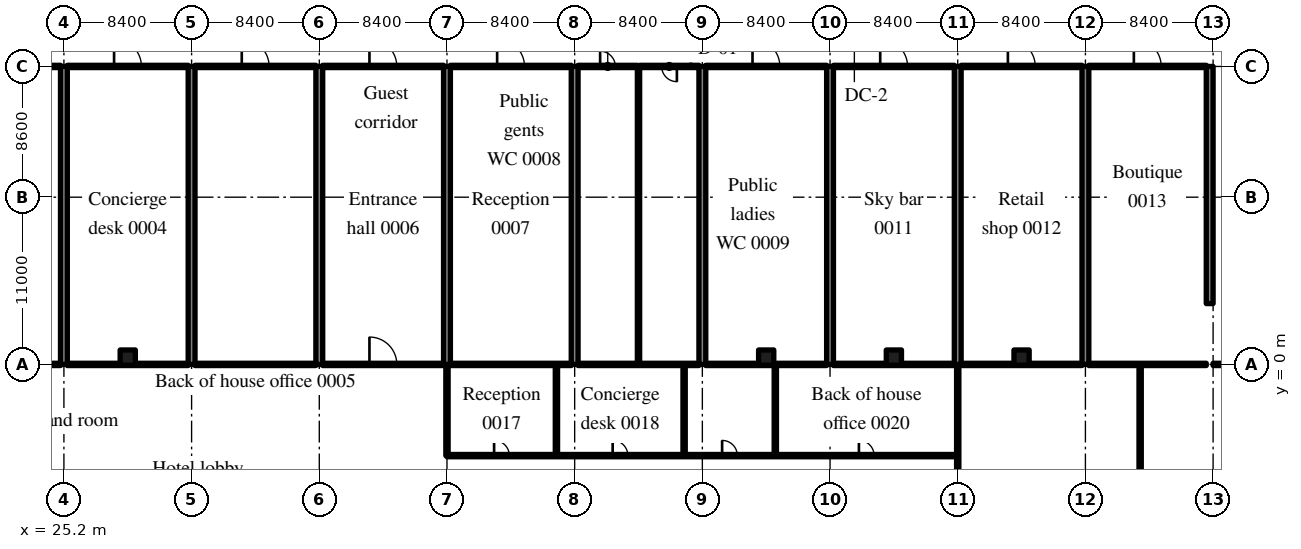
"""IFC4 building model, lengths in metres.
Left out: names, types, materials, properties, quantities, classifications, styles, units other than length and angle.
Written with IfcOpenShell. Run it as: python <this file> out.ifc"""

import sys

from ifc_helpers import new_model, si_unit, direction, frame, frame_2d, origin, origin_2d, place, context, subcontext, project, spatial, rectangle, extrude, source, transform, mapped, element, fill, save


model = new_model("IFC4")
c1 = context("Model", 3, precision=1e-05, world=origin(), true_north=direction((0.0, 1.0)))
c2 = subcontext(c1, "Body", "Model", "MODEL_VIEW")
j1 = project(units=[si_unit("LENGTHUNIT", "METRE"), si_unit("PLANEANGLEUNIT", "RADIAN")], contexts=[c1])
p1 = place(None, origin())
s1 = spatial("IfcSite", under=j1, at=p1, CompositionType="ELEMENT")
p2 = place(p1, origin())
s2 = spatial("IfcBuilding", under=s1, at=p2, CompositionType="ELEMENT")
p3 = place(p2, origin())
s3 = spatial("IfcBuildingStorey", under=s2, at=p3, CompositionType="ELEMENT", Elevation=0.0)
m1 = source(origin(), c2, "Body", "SweptSolid", [
    extrude(rectangle(XDim=19.6, YDim=0.45, at=frame_2d((9.8, 0.0))), origin(), (0.0, 0.0, 1.0), 5.72),
])
for number, where, z_axis, x_axis in (
    (1, (25.2, 0.0, 0.0), (0.0, 0.0, 1.0), (0.0, 1.0, 0.0)),
    (2, (33.6, 0.0, 0.0), (0.0, 0.0, 1.0), (0.0, 1.0, 0.0)),
    (3, (42.0, 0.0, 0.0), (0.0, 0.0, 1.0), (0.0, 1.0, 0.0)),
    (4, (50.4, 0.0, 0.0), (0.0, 0.0, 1.0), (0.0, 1.0, 0.0)),
    (5, (58.8, 0.0, 0.0), (0.0, 0.0, 1.0), (0.0, 1.0, 0.0)),
    (6, (67.2, 0.0, 0.0), (0.0, 0.0, 1.0), (0.0, 1.0, 0.0)),
    (7, (75.6, 0.0, 0.0), (0.0, 0.0, 1.0), (0.0, 1.0, 0.0)),
    (8, (84.0, 0.0, 0.0), (0.0, 0.0, 1.0), (0.0, 1.0, 0.0)),
    (9, (92.4, 0.0, 0.0), (0.0, 0.0, 1.0), (0.0, 1.0, 0.0)),
):
    element("IfcWall", number, at=place(p3, frame(where, z_axis=z_axis, x_axis=x_axis)), inside=s3, PredefinedType="SHEAR", context=c2, shape_type="MappedRepresentation", body=[
        mapped(m1, transform((0.0, 0.0, 0.0), scale=1.0)),
    ])
m2 = source(origin(), c2, "Body", "SweptSolid", [
    extrude(rectangle(XDim=15.6, YDim=0.45, at=frame_2d((7.8, 0.0))), origin(), (0.0, 0.0, 1.0), 5.72),
])
p4 = place(p3, frame((100.575, 4.0, 0.0), z_axis=(0.0, 0.0, 1.0), x_axis=(0.0, 1.0, 0.0)))
e10 = element("IfcWall", 10, at=p4, inside=s3, PredefinedType="SHEAR", context=c2, shape_type="MappedRepresentation", body=[
    mapped(m2, transform((0.0, 0.0, 0.0), scale=1.0)),
])
m3 = source(origin(), c2, "Body", "SweptSolid", [
    extrude(rectangle(XDim=1.0, YDim=1.0, at=origin_2d()), origin(), (0.0, 0.0, 1.0), 5.72),
])
for number, where, z_axis, x_axis in (
    (11, (29.4, 0.45, 0.0), (0.0, 0.0, 1.0), (1.0, 0.0, 0.0)),
    (12, (71.4, 0.45, 0.0), (0.0, 0.0, 1.0), (1.0, 0.0, 0.0)),
    (13, (79.8, 0.45, 0.0), (0.0, 0.0, 1.0), (1.0, 0.0, 0.0)),
    (14, (88.2, 0.45, 0.0), (0.0, 0.0, 1.0), (1.0, 0.0, 0.0)),
):
    element("IfcColumn", number, at=place(p3, frame(where, z_axis=z_axis, x_axis=x_axis)), inside=s3, PredefinedType="COLUMN", context=c2, shape_type="MappedRepresentation", body=[
        mapped(m3, transform((0.0, 0.0, 0.0), scale=1.0)),
    ])
m4 = source(origin(), c2, "Body", "SweptSolid", [
    extrude(rectangle(XDim=7.95, YDim=0.15, at=frame_2d((3.975, 0.0))), origin(), (0.0, 0.0, 1.0), 5.02),
])
p5 = place(p3, frame((17.025, 19.6, 0.0), z_axis=(0.0, 0.0, 1.0), x_axis=(1.0, 0.0, 0.0)))
e15 = element("IfcWall", 15, at=p5, inside=s3, PredefinedType="PARTITIONING", context=c2, shape_type="MappedRepresentation", body=[
    mapped(m4, transform((0.0, 0.0, 0.0), scale=1.0)),
])
m5 = source(origin(), c2, "Body", "SweptSolid", [
    extrude(rectangle(XDim=1.8, YDim=2.1, at=frame_2d((0.9, 1.05))), frame((0.0, 0.085, 0.0), z_axis=(0.0, -1.0, 0.0), x_axis=(1.0, 0.0, 0.0)), (0.0, 0.0, 1.0), 0.17),
])
p6 = place(p5, frame((3.075, 0.0, 0.0)))
e16 = element("IfcOpeningElement", 16, at=p6, cuts=e15, PredefinedType="OPENING", context=c2, shape_type="MappedRepresentation", body=[
    mapped(m5, transform((0.0, 0.0, 0.0), scale=1.0)),
])
m6 = source(origin(), c2, "Body", "SweptSolid", [
    extrude(rectangle(XDim=7.95, YDim=0.15, at=frame_2d((3.975, 0.0))), origin(), (0.0, 0.0, 1.0), 5.72),
])
p7 = place(p3, frame((17.025, 0.0, 0.0), z_axis=(0.0, 0.0, 1.0), x_axis=(1.0, 0.0, 0.0)))
e17 = element("IfcWall", 17, at=p7, inside=s3, PredefinedType="PARTITIONING", context=c2, shape_type="MappedRepresentation", body=[
    mapped(m6, transform((0.0, 0.0, 0.0), scale=1.0)),
])
m7 = source(origin(), c2, "Body", "SweptSolid", [
    extrude(rectangle(XDim=7.95, YDim=0.15, at=frame_2d((3.975, 0.0))), origin(), (0.0, 0.0, 1.0), 5.02),
])
p8 = place(p3, frame((25.425, 19.6, 0.0), z_axis=(0.0, 0.0, 1.0), x_axis=(1.0, 0.0, 0.0)))
e18 = element("IfcWall", 18, at=p8, inside=s3, PredefinedType="PARTITIONING", context=c2, shape_type="MappedRepresentation", body=[
    mapped(m7, transform((0.0, 0.0, 0.0), scale=1.0)),
])
p9 = place(p8, frame((3.075, 0.0, 0.0)))
e19 = element("IfcOpeningElement", 19, at=p9, cuts=e18, PredefinedType="OPENING", context=c2, shape_type="MappedRepresentation", body=[
    mapped(m5, transform((0.0, 0.0, 0.0), scale=1.0)),
])
m8 = source(origin(), c2, "Body", "SweptSolid", [
    extrude(rectangle(XDim=7.95, YDim=0.15, at=frame_2d((3.975, 0.0))), origin(), (0.0, 0.0, 1.0), 5.72),
])
p10 = place(p3, frame((25.425, 0.0, 0.0), z_axis=(0.0, 0.0, 1.0), x_axis=(1.0, 0.0, 0.0)))
e20 = element("IfcWall", 20, at=p10, inside=s3, PredefinedType="PARTITIONING", context=c2, shape_type="MappedRepresentation", body=[
    mapped(m8, transform((0.0, 0.0, 0.0), scale=1.0)),
])
p11 = place(p3, frame((33.825, 19.6, 0.0), z_axis=(0.0, 0.0, 1.0), x_axis=(1.0, 0.0, 0.0)))
e21 = element("IfcWall", 21, at=p11, inside=s3, PredefinedType="PARTITIONING", context=c2, shape_type="MappedRepresentation", body=[
    mapped(m7, transform((0.0, 0.0, 0.0), scale=1.0)),
])
p12 = place(p11, frame((3.075, 0.0, 0.0)))
e22 = element("IfcOpeningElement", 22, at=p12, cuts=e21, PredefinedType="OPENING", context=c2, shape_type="MappedRepresentation", body=[
    mapped(m5, transform((0.0, 0.0, 0.0), scale=1.0)),
])
p13 = place(p3, frame((33.825, 0.0, 0.0), z_axis=(0.0, 0.0, 1.0), x_axis=(1.0, 0.0, 0.0)))
e23 = element("IfcWall", 23, at=p13, inside=s3, PredefinedType="PARTITIONING", context=c2, shape_type="MappedRepresentation", body=[
    mapped(m8, transform((0.0, 0.0, 0.0), scale=1.0)),
])
p14 = place(p3, frame((42.225, 19.6, 0.0), z_axis=(0.0, 0.0, 1.0), x_axis=(1.0, 0.0, 0.0)))
e24 = element("IfcWall", 24, at=p14, inside=s3, PredefinedType="PARTITIONING", context=c2, shape_type="MappedRepresentation", body=[
    mapped(m7, transform((0.0, 0.0, 0.0), scale=1.0)),
])
p15 = place(p14, frame((3.075, 0.0, 0.0)))
e25 = element("IfcOpeningElement", 25, at=p15, cuts=e24, PredefinedType="OPENING", context=c2, shape_type="MappedRepresentation", body=[
    mapped(m5, transform((0.0, 0.0, 0.0), scale=1.0)),
])
p16 = place(p3, frame((42.225, 0.0, 0.0), z_axis=(0.0, 0.0, 1.0), x_axis=(1.0, 0.0, 0.0)))
e26 = element("IfcWall", 26, at=p16, inside=s3, PredefinedType="PARTITIONING", context=c2, shape_type="MappedRepresentation", body=[
    mapped(m8, transform((0.0, 0.0, 0.0), scale=1.0)),
])
p17 = place(p16, frame((3.075, 0.0, 0.0)))
e27 = element("IfcOpeningElement", 27, at=p17, cuts=e26, PredefinedType="OPENING", context=c2, shape_type="MappedRepresentation", body=[
    mapped(m5, transform((0.0, 0.0, 0.0), scale=1.0)),
])
p18 = place(p3, frame((50.625, 19.6, 0.0), z_axis=(0.0, 0.0, 1.0), x_axis=(1.0, 0.0, 0.0)))
e28 = element("IfcWall", 28, at=p18, inside=s3, PredefinedType="PARTITIONING", context=c2, shape_type="MappedRepresentation", body=[
    mapped(m7, transform((0.0, 0.0, 0.0), scale=1.0)),
])
p19 = place(p18, frame((3.075, 0.0, 0.0)))
e29 = element("IfcOpeningElement", 29, at=p19, cuts=e28, PredefinedType="OPENING", context=c2, shape_type="MappedRepresentation", body=[
    mapped(m5, transform((0.0, 0.0, 0.0), scale=1.0)),
])
p20 = place(p3, frame((50.625, 0.0, 0.0), z_axis=(0.0, 0.0, 1.0), x_axis=(1.0, 0.0, 0.0)))
e30 = element("IfcWall", 30, at=p20, inside=s3, PredefinedType="PARTITIONING", context=c2, shape_type="MappedRepresentation", body=[
    mapped(m8, transform((0.0, 0.0, 0.0), scale=1.0)),
])
m9 = source(origin(), c2, "Body", "SweptSolid", [
    extrude(rectangle(XDim=3.9, YDim=0.15, at=frame_2d((1.95, 0.0))), origin(), (0.0, 0.0, 1.0), 5.02),
])
p21 = place(p3, frame((59.025, 19.6, 0.0), z_axis=(0.0, 0.0, 1.0), x_axis=(1.0, 0.0, 0.0)))
e31 = element("IfcWall", 31, at=p21, inside=s3, PredefinedType="PARTITIONING", context=c2, shape_type="MappedRepresentation", body=[
    mapped(m9, transform((0.0, 0.0, 0.0), scale=1.0)),
])
m10 = source(origin(), c2, "Body", "SweptSolid", [
    extrude(rectangle(XDim=1.0, YDim=2.1, at=frame_2d((0.5, 1.05))), frame((0.0, 0.085, 0.0), z_axis=(0.0, -1.0, 0.0), x_axis=(1.0, 0.0, 0.0)), (0.0, 0.0, 1.0), 0.17),
])
p22 = place(p21, frame((1.45, 0.0, 0.0)))
e32 = element("IfcOpeningElement", 32, at=p22, cuts=e31, PredefinedType="OPENING", context=c2, shape_type="MappedRepresentation", body=[
    mapped(m10, transform((0.0, 0.0, 0.0), scale=1.0)),
])
p23 = place(p3, frame((63.075, 19.6, 0.0), z_axis=(0.0, 0.0, 1.0), x_axis=(1.0, 0.0, 0.0)))
e33 = element("IfcWall", 33, at=p23, inside=s3, PredefinedType="PARTITIONING", context=c2, shape_type="MappedRepresentation", body=[
    mapped(m9, transform((0.0, 0.0, 0.0), scale=1.0)),
])
p24 = place(p23, frame((1.45, 0.0, 0.0)))
e34 = element("IfcOpeningElement", 34, at=p24, cuts=e33, PredefinedType="OPENING", context=c2, shape_type="MappedRepresentation", body=[
    mapped(m10, transform((0.0, 0.0, 0.0), scale=1.0)),
])
m11 = source(origin(), c2, "Body", "SweptSolid", [
    extrude(rectangle(XDim=19.375, YDim=0.15, at=frame_2d((9.688, 0.0))), origin(), (0.0, 0.0, 1.0), 5.72),
])
p25 = place(p3, frame((63.0, 0.15, 0.0), z_axis=(0.0, 0.0, 1.0), x_axis=(0.0, 1.0, 0.0)))
e35 = element("IfcWall", 35, at=p25, inside=s3, PredefinedType="PARTITIONING", context=c2, shape_type="MappedRepresentation", body=[
    mapped(m11, transform((0.0, 0.0, 0.0), scale=1.0)),
])
p26 = place(p3, frame((59.025, 0.0, 0.0), z_axis=(0.0, 0.0, 1.0), x_axis=(1.0, 0.0, 0.0)))
e36 = element("IfcWall", 36, at=p26, inside=s3, PredefinedType="PARTITIONING", context=c2, shape_type="MappedRepresentation", body=[
    mapped(m6, transform((0.0, 0.0, 0.0), scale=1.0)),
])
p27 = place(p3, frame((67.425, 19.6, 0.0), z_axis=(0.0, 0.0, 1.0), x_axis=(1.0, 0.0, 0.0)))
e37 = element("IfcWall", 37, at=p27, inside=s3, PredefinedType="PARTITIONING", context=c2, shape_type="MappedRepresentation", body=[
    mapped(m7, transform((0.0, 0.0, 0.0), scale=1.0)),
])
p28 = place(p27, frame((3.075, 0.0, 0.0)))
e38 = element("IfcOpeningElement", 38, at=p28, cuts=e37, PredefinedType="OPENING", context=c2, shape_type="MappedRepresentation", body=[
    mapped(m5, transform((0.0, 0.0, 0.0), scale=1.0)),
])
p29 = place(p3, frame((67.425, 0.0, 0.0), z_axis=(0.0, 0.0, 1.0), x_axis=(1.0, 0.0, 0.0)))
e39 = element("IfcWall", 39, at=p29, inside=s3, PredefinedType="PARTITIONING", context=c2, shape_type="MappedRepresentation", body=[
    mapped(m8, transform((0.0, 0.0, 0.0), scale=1.0)),
])
p30 = place(p3, frame((75.825, 19.6, 0.0), z_axis=(0.0, 0.0, 1.0), x_axis=(1.0, 0.0, 0.0)))
e40 = element("IfcWall", 40, at=p30, inside=s3, PredefinedType="PARTITIONING", context=c2, shape_type="MappedRepresentation", body=[
    mapped(m7, transform((0.0, 0.0, 0.0), scale=1.0)),
])
p31 = place(p30, frame((3.075, 0.0, 0.0)))
e41 = element("IfcOpeningElement", 41, at=p31, cuts=e40, PredefinedType="OPENING", context=c2, shape_type="MappedRepresentation", body=[
    mapped(m5, transform((0.0, 0.0, 0.0), scale=1.0)),
])
p32 = place(p3, frame((75.825, 0.0, 0.0), z_axis=(0.0, 0.0, 1.0), x_axis=(1.0, 0.0, 0.0)))
e42 = element("IfcWall", 42, at=p32, inside=s3, PredefinedType="PARTITIONING", context=c2, shape_type="MappedRepresentation", body=[
    mapped(m8, transform((0.0, 0.0, 0.0), scale=1.0)),
])
p33 = place(p3, frame((84.225, 19.6, 0.0), z_axis=(0.0, 0.0, 1.0), x_axis=(1.0, 0.0, 0.0)))
e43 = element("IfcWall", 43, at=p33, inside=s3, PredefinedType="PARTITIONING", context=c2, shape_type="MappedRepresentation", body=[
    mapped(m7, transform((0.0, 0.0, 0.0), scale=1.0)),
])
p34 = place(p33, frame((3.075, 0.0, 0.0)))
e44 = element("IfcOpeningElement", 44, at=p34, cuts=e43, PredefinedType="OPENING", context=c2, shape_type="MappedRepresentation", body=[
    mapped(m5, transform((0.0, 0.0, 0.0), scale=1.0)),
])
p35 = place(p3, frame((84.225, 0.0, 0.0), z_axis=(0.0, 0.0, 1.0), x_axis=(1.0, 0.0, 0.0)))
e45 = element("IfcWall", 45, at=p35, inside=s3, PredefinedType="PARTITIONING", context=c2, shape_type="MappedRepresentation", body=[
    mapped(m8, transform((0.0, 0.0, 0.0), scale=1.0)),
])
m12 = source(origin(), c2, "Body", "SweptSolid", [
    extrude(rectangle(XDim=7.725, YDim=0.15, at=frame_2d((3.863, 0.0))), origin(), (0.0, 0.0, 1.0), 5.02),
])
p36 = place(p3, frame((92.625, 19.6, 0.0), z_axis=(0.0, 0.0, 1.0), x_axis=(1.0, 0.0, 0.0)))
e46 = element("IfcWall", 46, at=p36, inside=s3, PredefinedType="PARTITIONING", context=c2, shape_type="MappedRepresentation", body=[
    mapped(m12, transform((0.0, 0.0, 0.0), scale=1.0)),
])
p37 = place(p36, frame((2.962, 0.0, 0.0)))
e47 = element("IfcOpeningElement", 47, at=p37, cuts=e46, PredefinedType="OPENING", context=c2, shape_type="MappedRepresentation", body=[
    mapped(m5, transform((0.0, 0.0, 0.0), scale=1.0)),
])
m13 = source(origin(), c2, "Body", "SweptSolid", [
    extrude(rectangle(XDim=7.725, YDim=0.15, at=frame_2d((3.863, 0.0))), origin(), (0.0, 0.0, 1.0), 5.72),
])
p38 = place(p3, frame((92.625, 0.0, 0.0), z_axis=(0.0, 0.0, 1.0), x_axis=(1.0, 0.0, 0.0)))
e48 = element("IfcWall", 48, at=p38, inside=s3, PredefinedType="PARTITIONING", context=c2, shape_type="MappedRepresentation", body=[
    mapped(m13, transform((0.0, 0.0, 0.0), scale=1.0)),
])
m14 = source(origin(), c2, "Body", "SweptSolid", [
    extrude(rectangle(XDim=20.845, YDim=0.15, at=frame_2d((10.422, 0.0))), origin(), (0.0, 0.0, 1.0), 4.12),
])
p39 = place(p3, frame((84.0, -20.92, 0.0), z_axis=(0.0, 0.0, 1.0), x_axis=(0.0, 1.0, 0.0)))
e49 = element("IfcWall", 49, at=p39, inside=s3, PredefinedType="PARTITIONING", context=c2, shape_type="MappedRepresentation", body=[
    mapped(m14, transform((0.0, 0.0, 0.0), scale=1.0)),
])
p40 = place(p39, frame((10.27, 0.0, 0.0)))
e50 = element("IfcOpeningElement", 50, at=p40, cuts=e49, PredefinedType="OPENING", context=c2, shape_type="MappedRepresentation", body=[
    mapped(m5, transform((0.0, 0.0, 0.0), scale=1.0)),
])
m15 = source(origin(), c2, "Body", "SweptSolid", [
    extrude(rectangle(XDim=23.425, YDim=0.15, at=frame_2d((11.712, 0.0))), origin(), (0.0, 0.0, 1.0), 5.72),
])
p41 = place(p3, frame((96.0, -23.5, 0.0), z_axis=(0.0, 0.0, 1.0), x_axis=(0.0, 1.0, 0.0)))
e51 = element("IfcWall", 51, at=p41, inside=s3, PredefinedType="PARTITIONING", context=c2, shape_type="MappedRepresentation", body=[
    mapped(m15, transform((0.0, 0.0, 0.0), scale=1.0)),
])
p42 = place(p41, frame((10.6, 0.0, 0.0)))
e52 = element("IfcOpeningElement", 52, at=p42, cuts=e51, PredefinedType="OPENING", context=c2, shape_type="MappedRepresentation", body=[
    mapped(m5, transform((0.0, 0.0, 0.0), scale=1.0)),
])
m16 = source(origin(), c2, "Body", "SweptSolid", [
    extrude(rectangle(XDim=33.6, YDim=0.15, at=frame_2d((16.8, 0.0))), origin(), (0.0, 0.0, 1.0), 5.72),
])
p43 = place(p3, frame((50.4, -6.0, 0.0), z_axis=(0.0, 0.0, 1.0), x_axis=(1.0, 0.0, 0.0)))
e53 = element("IfcWall", 53, at=p43, inside=s3, PredefinedType="PARTITIONING", context=c2, shape_type="MappedRepresentation", body=[
    mapped(m16, transform((0.0, 0.0, 0.0), scale=1.0)),
])
p44 = place(p43, frame((3.1, 0.0, 0.0)))
e54 = element("IfcOpeningElement", 54, at=p44, cuts=e53, PredefinedType="OPENING", context=c2, shape_type="MappedRepresentation", body=[
    mapped(m10, transform((0.0, 0.0, 0.0), scale=1.0)),
])
p45 = place(p43, frame((10.9, 0.0, 0.0)))
e55 = element("IfcOpeningElement", 55, at=p45, cuts=e53, PredefinedType="OPENING", context=c2, shape_type="MappedRepresentation", body=[
    mapped(m10, transform((0.0, 0.0, 0.0), scale=1.0)),
])
p46 = place(p43, frame((18.1, 0.0, 0.0)))
e56 = element("IfcOpeningElement", 56, at=p46, cuts=e53, PredefinedType="OPENING", context=c2, shape_type="MappedRepresentation", body=[
    mapped(m10, transform((0.0, 0.0, 0.0), scale=1.0)),
])
p47 = place(p43, frame((27.1, 0.0, 0.0)))
e57 = element("IfcOpeningElement", 57, at=p47, cuts=e53, PredefinedType="OPENING", context=c2, shape_type="MappedRepresentation", body=[
    mapped(m10, transform((0.0, 0.0, 0.0), scale=1.0)),
])
m17 = source(origin(), c2, "Body", "SweptSolid", [
    extrude(rectangle(XDim=5.925, YDim=0.15, at=frame_2d((2.962, 0.0))), origin(), (0.0, 0.0, 1.0), 4.12),
])
p48 = place(p3, frame((50.4, -6.0, 0.0), z_axis=(0.0, 0.0, 1.0), x_axis=(0.0, 1.0, 0.0)))
e58 = element("IfcWall", 58, at=p48, inside=s3, PredefinedType="PARTITIONING", context=c2, shape_type="MappedRepresentation", body=[
    mapped(m17, transform((0.0, 0.0, 0.0), scale=1.0)),
])
m18 = source(origin(), c2, "Body", "SweptSolid", [
    extrude(rectangle(XDim=5.925, YDim=0.15, at=frame_2d((2.962, 0.0))), origin(), (0.0, 0.0, 1.0), 5.72),
])
for number, where, z_axis, x_axis in (
    (59, (57.6, -6.0, 0.0), (0.0, 0.0, 1.0), (0.0, 1.0, 0.0)),
    (60, (66.0, -6.0, 0.0), (0.0, 0.0, 1.0), (0.0, 1.0, 0.0)),
    (61, (72.0, -6.0, 0.0), (0.0, 0.0, 1.0), (0.0, 1.0, 0.0)),
):
    element("IfcWall", number, at=place(p3, frame(where, z_axis=z_axis, x_axis=x_axis)), inside=s3, PredefinedType="PARTITIONING", context=c2, shape_type="MappedRepresentation", body=[
        mapped(m18, transform((0.0, 0.0, 0.0), scale=1.0)),
    ])
m19 = source(origin(), c2, "Body", "SweptSolid", [
    extrude(rectangle(XDim=7.9, YDim=0.15, at=frame_2d((3.95, 0.0))), origin(), (0.0, 0.0, 1.0), 5.72),
])
p49 = place(p3, frame((100.8, 0.0, 0.0), z_axis=(0.0, 0.0, 1.0), x_axis=(1.0, 0.0, 0.0)))
e62 = element("IfcWall", 62, at=p49, inside=s3, PredefinedType="PARTITIONING", context=c2, shape_type="MappedRepresentation", body=[
    mapped(m19, transform((0.0, 0.0, 0.0), scale=1.0)),
])
m20 = source(origin(), c2, "Body", "SweptSolid", [
    extrude(rectangle(XDim=1.8, YDim=2.1, at=frame_2d((0.9, 1.05))), frame((0.0, 0.025, 0.0), z_axis=(0.0, -1.0, 0.0), x_axis=(1.0, 0.0, 0.0)), (0.0, 0.0, 1.0), 0.05),
])
p50 = place(p9, origin())
e63 = element("IfcDoor", 63, at=p50, inside=s3, OperationType="DOUBLE_DOOR_SINGLE_SWING", PredefinedType="DOOR", context=c2, shape_type="MappedRepresentation", body=[
    mapped(m20, transform((0.0, 0.0, 0.0), scale=1.0)),
])
fill(e19, e63)
p51 = place(p12, origin())
e64 = element("IfcDoor", 64, at=p51, inside=s3, OperationType="DOUBLE_DOOR_SINGLE_SWING", PredefinedType="DOOR", context=c2, shape_type="MappedRepresentation", body=[
    mapped(m20, transform((0.0, 0.0, 0.0), scale=1.0)),
])
fill(e22, e64)
p52 = place(p15, origin())
e65 = element("IfcDoor", 65, at=p52, inside=s3, OperationType="DOUBLE_DOOR_SINGLE_SWING", PredefinedType="DOOR", context=c2, shape_type="MappedRepresentation", body=[
    mapped(m20, transform((0.0, 0.0, 0.0), scale=1.0)),
])
fill(e25, e65)
p53 = place(p17, origin())
e66 = element("IfcDoor", 66, at=p53, inside=s3, OperationType="DOUBLE_DOOR_SINGLE_SWING", PredefinedType="DOOR", context=c2, shape_type="MappedRepresentation", body=[
    mapped(m20, transform((0.0, 0.0, 0.0), scale=1.0)),
])
fill(e27, e66)
p54 = place(p19, origin())
e67 = element("IfcDoor", 67, at=p54, inside=s3, OperationType="DOUBLE_DOOR_SINGLE_SWING", PredefinedType="DOOR", context=c2, shape_type="MappedRepresentation", body=[
    mapped(m20, transform((0.0, 0.0, 0.0), scale=1.0)),
])
fill(e29, e67)
m21 = source(origin(), c2, "Body", "SweptSolid", [
    extrude(rectangle(XDim=1.0, YDim=2.1, at=frame_2d((0.5, 1.05))), frame((0.0, 0.025, 0.0), z_axis=(0.0, -1.0, 0.0), x_axis=(1.0, 0.0, 0.0)), (0.0, 0.0, 1.0), 0.05),
])
p55 = place(p22, origin())
e68 = element("IfcDoor", 68, at=p55, inside=s3, OperationType="SINGLE_SWING_LEFT", PredefinedType="DOOR", context=c2, shape_type="MappedRepresentation", body=[
    mapped(m21, transform((0.0, 0.0, 0.0), scale=1.0)),
])
fill(e32, e68)
p56 = place(p24, origin())
e69 = element("IfcDoor", 69, at=p56, inside=s3, OperationType="SINGLE_SWING_RIGHT", PredefinedType="DOOR", context=c2, shape_type="MappedRepresentation", body=[
    mapped(m21, transform((0.0, 0.0, 0.0), scale=1.0)),
])
fill(e34, e69)
p57 = place(p28, origin())
e70 = element("IfcDoor", 70, at=p57, inside=s3, OperationType="DOUBLE_DOOR_SINGLE_SWING", PredefinedType="DOOR", context=c2, shape_type="MappedRepresentation", body=[
    mapped(m20, transform((0.0, 0.0, 0.0), scale=1.0)),
])
fill(e38, e70)
p58 = place(p31, origin())
e71 = element("IfcDoor", 71, at=p58, inside=s3, OperationType="DOUBLE_DOOR_SINGLE_SWING", PredefinedType="DOOR", context=c2, shape_type="MappedRepresentation", body=[
    mapped(m20, transform((0.0, 0.0, 0.0), scale=1.0)),
])
fill(e41, e71)
p59 = place(p34, origin())
e72 = element("IfcDoor", 72, at=p59, inside=s3, OperationType="DOUBLE_DOOR_SINGLE_SWING", PredefinedType="DOOR", context=c2, shape_type="MappedRepresentation", body=[
    mapped(m20, transform((0.0, 0.0, 0.0), scale=1.0)),
])
fill(e44, e72)
p60 = place(p37, origin())
e73 = element("IfcDoor", 73, at=p60, inside=s3, OperationType="DOUBLE_DOOR_SINGLE_SWING", PredefinedType="DOOR", context=c2, shape_type="MappedRepresentation", body=[
    mapped(m20, transform((0.0, 0.0, 0.0), scale=1.0)),
])
fill(e47, e73)
p61 = place(p44, origin())
e74 = element("IfcDoor", 74, at=p61, inside=s3, OperationType="SINGLE_SWING_LEFT", PredefinedType="DOOR", context=c2, shape_type="MappedRepresentation", body=[
    mapped(m21, transform((0.0, 0.0, 0.0), scale=1.0)),
])
fill(e54, e74)
p62 = place(p45, origin())
e75 = element("IfcDoor", 75, at=p62, inside=s3, OperationType="SINGLE_SWING_LEFT", PredefinedType="DOOR", context=c2, shape_type="MappedRepresentation", body=[
    mapped(m21, transform((0.0, 0.0, 0.0), scale=1.0)),
])
fill(e55, e75)
p63 = place(p46, origin())
e76 = element("IfcDoor", 76, at=p63, inside=s3, OperationType="SINGLE_SWING_LEFT", PredefinedType="DOOR", context=c2, shape_type="MappedRepresentation", body=[
    mapped(m21, transform((0.0, 0.0, 0.0), scale=1.0)),
])
fill(e56, e76)
p64 = place(p47, origin())
e77 = element("IfcDoor", 77, at=p64, inside=s3, OperationType="SINGLE_SWING_LEFT", PredefinedType="DOOR", context=c2, shape_type="MappedRepresentation", body=[
    mapped(m21, transform((0.0, 0.0, 0.0), scale=1.0)),
])
fill(e57, e77)
save(model, sys.argv[1])
